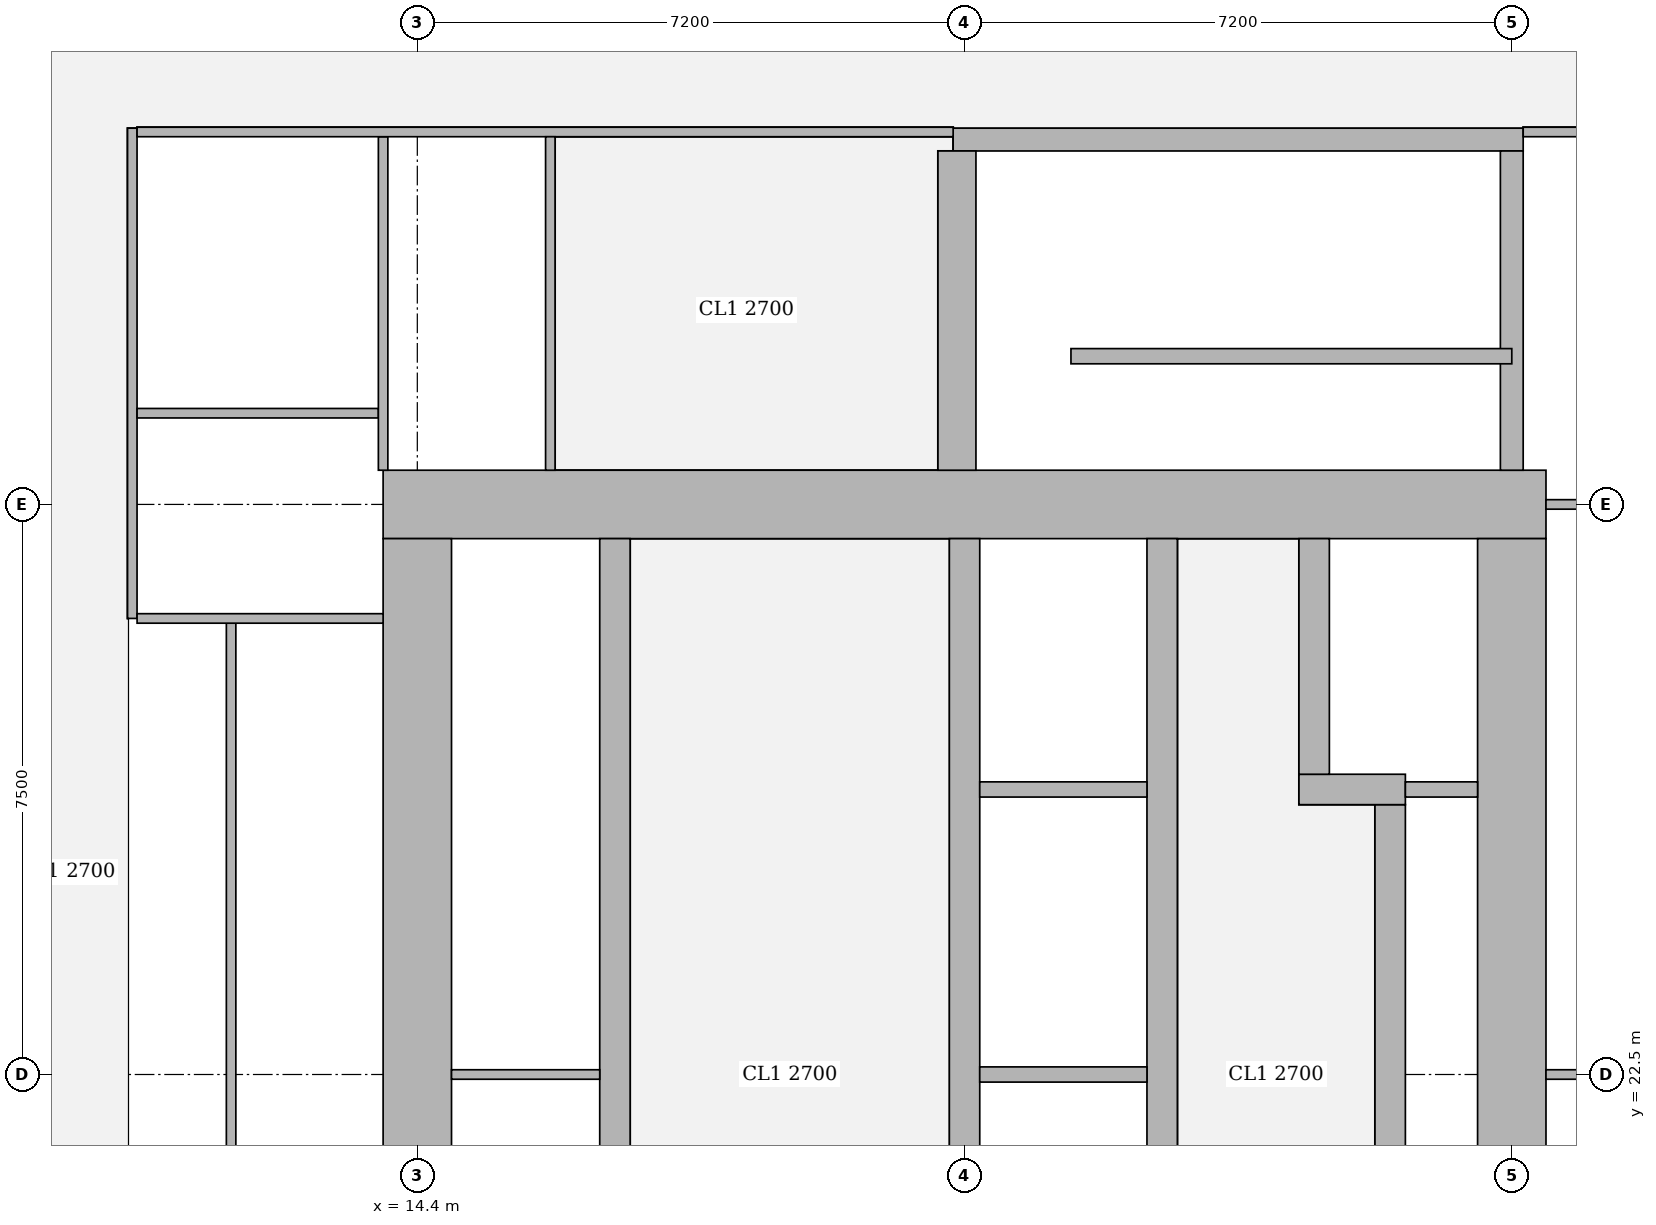
"""IFC4 building model, lengths in metres.
Left out: names, types, materials, properties, quantities, classifications, styles, units other than length and angle.
Written with IfcOpenShell. Run it as: python <this file> out.ifc"""

import sys

from ifc_helpers import new_model, si_unit, direction, frame, frame_2d, origin, place, context, subcontext, project, spatial, rectangle, extrude, element, fill, save


model = new_model("IFC4")
c1 = context("Model", 3, precision=1e-05, world=origin(), true_north=direction((0.0, 1.0)))
c2 = subcontext(c1, "Body", "Model", "MODEL_VIEW")
j1 = project(units=[si_unit("LENGTHUNIT", "METRE"), si_unit("PLANEANGLEUNIT", "RADIAN")], contexts=[c1])
p1 = place(None, origin())
s1 = spatial("IfcSite", under=j1, at=p1, CompositionType="ELEMENT")
p2 = place(p1, origin())
s2 = spatial("IfcBuilding", under=s1, at=p2, CompositionType="ELEMENT")
p3 = place(p2, frame((0.0, 0.0, 216.2)))
s3 = spatial("IfcBuildingStorey", under=s2, at=p3, CompositionType="ELEMENT", Elevation=216.2)
p4 = place(p3, frame((13.95, 30.0, 0.0), z_axis=(0.0, 0.0, 1.0), x_axis=(1.0, 0.0, 0.0)))
e1 = element("IfcWall", 1, at=p4, inside=s3, PredefinedType="SHEAR", context=c2, shape_type="SweptSolid", body=[
    extrude(rectangle(XDim=15.3, YDim=0.9, at=frame_2d((7.65, 0.0))), origin(), (0.0, 0.0, 1.0), 3.75),
])
p5 = place(p4, frame((4.45, 0.0, 0.0)))
e2 = element("IfcOpeningElement", 2, at=p5, cuts=e1, PredefinedType="OPENING", context=c2, shape_type="SweptSolid", body=[
    extrude(rectangle(XDim=1.8, YDim=2.1, at=frame_2d((0.9, 1.05))), frame((0.0, 0.46, 0.0), z_axis=(0.0, -1.0, 0.0), x_axis=(1.0, 0.0, 0.0)), (0.0, 0.0, 1.0), 0.92),
])
p6 = place(p4, frame((10.7, 0.0, 0.0)))
e3 = element("IfcOpeningElement", 3, at=p6, cuts=e1, PredefinedType="OPENING", context=c2, shape_type="SweptSolid", body=[
    extrude(rectangle(XDim=1.1, YDim=2.1, at=frame_2d((0.55, 1.05))), frame((0.0, 0.46, 0.0), z_axis=(0.0, -1.0, 0.0), x_axis=(1.0, 0.0, 0.0)), (0.0, 0.0, 1.0), 0.92),
])
for number, where, z_axis, x_axis in (
    (4, (14.4, 15.45, 0.0), (0.0, 0.0, 1.0), (0.0, 1.0, 0.0)),
    (5, (28.8, 15.45, 0.0), (0.0, 0.0, 1.0), (0.0, 1.0, 0.0)),
):
    element("IfcWall", number, at=place(p3, frame(where, z_axis=z_axis, x_axis=x_axis)), inside=s3, PredefinedType="SHEAR", context=c2, shape_type="SweptSolid", body=[
        extrude(rectangle(XDim=14.1, YDim=0.9, at=frame_2d((7.05, 0.0))), origin(), (0.0, 0.0, 1.0), 3.75),
    ])
p7 = place(p3, frame((17.0, 15.45, 0.0), z_axis=(0.0, 0.0, 1.0), x_axis=(0.0, 1.0, 0.0)))
e6 = element("IfcWall", 6, at=p7, inside=s3, PredefinedType="SHEAR", context=c2, shape_type="SweptSolid", body=[
    extrude(rectangle(XDim=14.1, YDim=0.4, at=frame_2d((7.05, 0.0))), origin(), (0.0, 0.0, 1.0), 3.75),
])
p8 = place(p7, frame((0.925, 0.0, 0.0)))
e7 = element("IfcOpeningElement", 7, at=p8, cuts=e6, PredefinedType="OPENING", context=c2, shape_type="SweptSolid", body=[
    extrude(rectangle(XDim=1.0, YDim=2.1, at=frame_2d((0.5, 1.05))), frame((0.0, 0.21, 0.0), z_axis=(0.0, -1.0, 0.0), x_axis=(1.0, 0.0, 0.0)), (0.0, 0.0, 1.0), 0.42),
])
p9 = place(p7, frame((4.675, 0.0, 0.0)))
e8 = element("IfcOpeningElement", 8, at=p9, cuts=e6, PredefinedType="OPENING", context=c2, shape_type="SweptSolid", body=[
    extrude(rectangle(XDim=1.0, YDim=2.1, at=frame_2d((0.5, 1.05))), frame((0.0, 0.21, 0.0), z_axis=(0.0, -1.0, 0.0), x_axis=(1.0, 0.0, 0.0)), (0.0, 0.0, 1.0), 0.42),
])
p10 = place(p7, frame((8.425, 0.0, 0.0)))
e9 = element("IfcOpeningElement", 9, at=p10, cuts=e6, PredefinedType="OPENING", context=c2, shape_type="SweptSolid", body=[
    extrude(rectangle(XDim=1.0, YDim=2.1, at=frame_2d((0.5, 1.05))), frame((0.0, 0.21, 0.0), z_axis=(0.0, -1.0, 0.0), x_axis=(1.0, 0.0, 0.0)), (0.0, 0.0, 1.0), 0.42),
])
p11 = place(p7, frame((12.175, 0.0, 0.0)))
e10 = element("IfcOpeningElement", 10, at=p11, cuts=e6, PredefinedType="OPENING", context=c2, shape_type="SweptSolid", body=[
    extrude(rectangle(XDim=1.0, YDim=2.1, at=frame_2d((0.5, 1.05))), frame((0.0, 0.21, 0.0), z_axis=(0.0, -1.0, 0.0), x_axis=(1.0, 0.0, 0.0)), (0.0, 0.0, 1.0), 0.42),
])
p12 = place(p3, frame((21.6, 15.45, 0.0), z_axis=(0.0, 0.0, 1.0), x_axis=(0.0, 1.0, 0.0)))
e11 = element("IfcWall", 11, at=p12, inside=s3, PredefinedType="SHEAR", context=c2, shape_type="SweptSolid", body=[
    extrude(rectangle(XDim=14.1, YDim=0.4, at=frame_2d((7.05, 0.0))), origin(), (0.0, 0.0, 1.0), 3.75),
])
p13 = place(p12, frame((0.875, 0.0, 0.0)))
e12 = element("IfcOpeningElement", 12, at=p13, cuts=e11, PredefinedType="OPENING", context=c2, shape_type="SweptSolid", body=[
    extrude(rectangle(XDim=1.1, YDim=2.1, at=frame_2d((0.55, 1.05))), frame((0.0, 0.21, 0.0), z_axis=(0.0, -1.0, 0.0), x_axis=(1.0, 0.0, 0.0)), (0.0, 0.0, 1.0), 0.42),
])
p14 = place(p12, frame((4.625, 0.0, 0.0)))
e13 = element("IfcOpeningElement", 13, at=p14, cuts=e11, PredefinedType="OPENING", context=c2, shape_type="SweptSolid", body=[
    extrude(rectangle(XDim=1.1, YDim=2.1, at=frame_2d((0.55, 1.05))), frame((0.0, 0.21, 0.0), z_axis=(0.0, -1.0, 0.0), x_axis=(1.0, 0.0, 0.0)), (0.0, 0.0, 1.0), 0.42),
])
p15 = place(p12, frame((8.375, 0.0, 0.0)))
e14 = element("IfcOpeningElement", 14, at=p15, cuts=e11, PredefinedType="OPENING", context=c2, shape_type="SweptSolid", body=[
    extrude(rectangle(XDim=1.1, YDim=2.1, at=frame_2d((0.55, 1.05))), frame((0.0, 0.21, 0.0), z_axis=(0.0, -1.0, 0.0), x_axis=(1.0, 0.0, 0.0)), (0.0, 0.0, 1.0), 0.42),
])
p16 = place(p12, frame((12.125, 0.0, 0.0)))
e15 = element("IfcOpeningElement", 15, at=p16, cuts=e11, PredefinedType="OPENING", context=c2, shape_type="SweptSolid", body=[
    extrude(rectangle(XDim=1.1, YDim=2.1, at=frame_2d((0.55, 1.05))), frame((0.0, 0.21, 0.0), z_axis=(0.0, -1.0, 0.0), x_axis=(1.0, 0.0, 0.0)), (0.0, 0.0, 1.0), 0.42),
])
p17 = place(p3, frame((24.2, 15.45, 0.0), z_axis=(0.0, 0.0, 1.0), x_axis=(0.0, 1.0, 0.0)))
e16 = element("IfcWall", 16, at=p17, inside=s3, PredefinedType="SHEAR", context=c2, shape_type="SweptSolid", body=[
    extrude(rectangle(XDim=14.1, YDim=0.4, at=frame_2d((7.05, 0.0))), origin(), (0.0, 0.0, 1.0), 3.75),
])
p18 = place(p3, frame((27.2, 18.95, 0.0), z_axis=(0.0, 0.0, 1.0), x_axis=(0.0, 1.0, 0.0)))
e17 = element("IfcWall", 17, at=p18, inside=s3, PredefinedType="SHEAR", context=c2, shape_type="SweptSolid", body=[
    extrude(rectangle(XDim=7.1, YDim=0.4, at=frame_2d((3.55, 0.0))), origin(), (0.0, 0.0, 1.0), 3.75),
])
p19 = place(p3, frame((26.0, 26.25, 0.0), z_axis=(0.0, 0.0, 1.0), x_axis=(1.0, 0.0, 0.0)))
e18 = element("IfcWall", 18, at=p19, inside=s3, PredefinedType="SHEAR", context=c2, shape_type="SweptSolid", body=[
    extrude(rectangle(XDim=1.4, YDim=0.4, at=frame_2d((0.7, 0.0))), origin(), (0.0, 0.0, 1.0), 3.75),
])
p20 = place(p3, frame((26.2, 26.45, 0.0), z_axis=(0.0, 0.0, 1.0), x_axis=(0.0, 1.0, 0.0)))
e19 = element("IfcWall", 19, at=p20, inside=s3, PredefinedType="SHEAR", context=c2, shape_type="SweptSolid", body=[
    extrude(rectangle(XDim=3.1, YDim=0.4, at=frame_2d((1.55, 0.0))), origin(), (0.0, 0.0, 1.0), 3.75),
])
p21 = place(p20, frame((1.075, 0.0, 0.0)))
e20 = element("IfcOpeningElement", 20, at=p21, cuts=e19, PredefinedType="OPENING", context=c2, shape_type="SweptSolid", body=[
    extrude(rectangle(XDim=1.2, YDim=2.1, at=frame_2d((0.6, 1.05))), frame((0.0, 0.21, 0.0), z_axis=(0.0, -1.0, 0.0), x_axis=(1.0, 0.0, 0.0)), (0.0, 0.0, 1.0), 0.42),
])
p22 = place(p3, frame((21.45, 34.8, 0.0), z_axis=(0.0, 0.0, 1.0), x_axis=(1.0, 0.0, 0.0)))
e21 = element("IfcWall", 21, at=p22, inside=s3, PredefinedType="SHEAR", context=c2, shape_type="SweptSolid", body=[
    extrude(rectangle(XDim=7.5, YDim=0.3, at=frame_2d((3.75, 0.0))), origin(), (0.0, 0.0, 1.0), 3.75),
])
p23 = place(p22, frame((0.5, 0.0, 0.0)))
e22 = element("IfcOpeningElement", 22, at=p23, cuts=e21, PredefinedType="OPENING", context=c2, shape_type="SweptSolid", body=[
    extrude(rectangle(XDim=1.1, YDim=2.1, at=frame_2d((0.55, 1.05))), frame((0.0, 0.16, 0.0), z_axis=(0.0, -1.0, 0.0), x_axis=(1.0, 0.0, 0.0)), (0.0, 0.0, 1.0), 0.32),
])
p24 = place(p3, frame((21.5, 30.45, 0.0), z_axis=(0.0, 0.0, 1.0), x_axis=(0.0, 1.0, 0.0)))
e23 = element("IfcWall", 23, at=p24, inside=s3, PredefinedType="SHEAR", context=c2, shape_type="SweptSolid", body=[
    extrude(rectangle(XDim=4.2, YDim=0.5, at=frame_2d((2.1, 0.0))), origin(), (0.0, 0.0, 1.0), 3.75),
])
p25 = place(p3, frame((28.8, 30.45, 0.0), z_axis=(0.0, 0.0, 1.0), x_axis=(0.0, 1.0, 0.0)))
e24 = element("IfcWall", 24, at=p25, inside=s3, PredefinedType="SHEAR", context=c2, shape_type="SweptSolid", body=[
    extrude(rectangle(XDim=4.2, YDim=0.3, at=frame_2d((2.1, 0.0))), origin(), (0.0, 0.0, 1.0), 3.75),
])
p26 = place(p3, frame((10.65, 28.5, 0.0), z_axis=(0.0, 0.0, 1.0), x_axis=(0.0, 1.0, 0.0)))
e25 = element("IfcWall", 25, at=p26, inside=s3, PredefinedType="PARTITIONING", context=c2, shape_type="SweptSolid", body=[
    extrude(rectangle(XDim=6.45, YDim=0.125, at=frame_2d((3.225, 0.0))), origin(), (0.0, 0.0, 1.0), 3.5),
])
p27 = place(p26, frame((0.85, 0.0, 0.0)))
e26 = element("IfcOpeningElement", 26, at=p27, cuts=e25, PredefinedType="OPENING", context=c2, shape_type="SweptSolid", body=[
    extrude(rectangle(XDim=1.0, YDim=2.1, at=frame_2d((0.5, 1.05))), frame((0.0, 0.073, 0.0), z_axis=(0.0, -1.0, 0.0), x_axis=(1.0, 0.0, 0.0)), (0.0, 0.0, 1.0), 0.145),
])
p28 = place(p26, frame((4.075, 0.0, 0.0)))
e27 = element("IfcOpeningElement", 27, at=p28, cuts=e25, PredefinedType="OPENING", context=c2, shape_type="SweptSolid", body=[
    extrude(rectangle(XDim=1.0, YDim=2.1, at=frame_2d((0.5, 1.05))), frame((0.0, 0.073, 0.0), z_axis=(0.0, -1.0, 0.0), x_axis=(1.0, 0.0, 0.0)), (0.0, 0.0, 1.0), 0.145),
])
p29 = place(p3, frame((11.95, 19.562, 0.0), z_axis=(0.0, 0.0, 1.0), x_axis=(0.0, 1.0, 0.0)))
e28 = element("IfcWall", 28, at=p29, inside=s3, PredefinedType="PARTITIONING", context=c2, shape_type="SweptSolid", body=[
    extrude(rectangle(XDim=8.876, YDim=0.125, at=frame_2d((4.438, 0.0))), origin(), (0.0, 0.0, 1.0), 3.5),
])
p30 = place(p29, frame((3.938, 0.0, 0.0)))
e29 = element("IfcOpeningElement", 29, at=p30, cuts=e28, PredefinedType="OPENING", context=c2, shape_type="SweptSolid", body=[
    extrude(rectangle(XDim=1.0, YDim=2.1, at=frame_2d((0.5, 1.05))), frame((0.0, 0.073, 0.0), z_axis=(0.0, -1.0, 0.0), x_axis=(1.0, 0.0, 0.0)), (0.0, 0.0, 1.0), 0.145),
])
p31 = place(p3, frame((10.713, 28.5, 0.0), z_axis=(0.0, 0.0, 1.0), x_axis=(1.0, 0.0, 0.0)))
e30 = element("IfcWall", 30, at=p31, inside=s3, PredefinedType="PARTITIONING", context=c2, shape_type="SweptSolid", body=[
    extrude(rectangle(XDim=3.237, YDim=0.125, at=frame_2d((1.619, 0.0))), origin(), (0.0, 0.0, 1.0), 3.5),
])
p32 = place(p3, frame((10.713, 31.2, 0.0), z_axis=(0.0, 0.0, 1.0), x_axis=(1.0, 0.0, 0.0)))
e31 = element("IfcWall", 31, at=p32, inside=s3, PredefinedType="PARTITIONING", context=c2, shape_type="SweptSolid", body=[
    extrude(rectangle(XDim=3.175, YDim=0.125, at=frame_2d((1.587, 0.0))), origin(), (0.0, 0.0, 1.0), 3.5),
])
p33 = place(p3, frame((13.95, 30.45, 0.0), z_axis=(0.0, 0.0, 1.0), x_axis=(0.0, 1.0, 0.0)))
e32 = element("IfcWall", 32, at=p33, inside=s3, PredefinedType="PARTITIONING", context=c2, shape_type="SweptSolid", body=[
    extrude(rectangle(XDim=4.387, YDim=0.125, at=frame_2d((2.193, 0.0))), origin(), (0.0, 0.0, 1.0), 3.5),
])
p34 = place(p3, frame((10.713, 34.9, 0.0), z_axis=(0.0, 0.0, 1.0), x_axis=(1.0, 0.0, 0.0)))
e33 = element("IfcWall", 33, at=p34, inside=s3, PredefinedType="PARTITIONING", context=c2, shape_type="SweptSolid", body=[
    extrude(rectangle(XDim=10.737, YDim=0.125, at=frame_2d((5.369, 0.0))), origin(), (0.0, 0.0, 1.0), 3.5),
])
p35 = place(p34, frame((7.187, 0.0, 0.0)))
e34 = element("IfcOpeningElement", 34, at=p35, cuts=e33, PredefinedType="OPENING", context=c2, shape_type="SweptSolid", body=[
    extrude(rectangle(XDim=1.8, YDim=2.1, at=frame_2d((0.9, 1.05))), frame((0.0, 0.073, 0.0), z_axis=(0.0, -1.0, 0.0), x_axis=(1.0, 0.0, 0.0)), (0.0, 0.0, 1.0), 0.145),
])
p36 = place(p3, frame((16.15, 30.45, 0.0), z_axis=(0.0, 0.0, 1.0), x_axis=(0.0, 1.0, 0.0)))
e35 = element("IfcWall", 35, at=p36, inside=s3, PredefinedType="PARTITIONING", context=c2, shape_type="SweptSolid", body=[
    extrude(rectangle(XDim=4.387, YDim=0.125, at=frame_2d((2.193, 0.0))), origin(), (0.0, 0.0, 1.0), 3.5),
])
p37 = place(p36, frame((1.75, 0.0, 0.0)))
e36 = element("IfcOpeningElement", 36, at=p37, cuts=e35, PredefinedType="OPENING", context=c2, shape_type="SweptSolid", body=[
    extrude(rectangle(XDim=1.0, YDim=2.1, at=frame_2d((0.5, 1.05))), frame((0.0, 0.073, 0.0), z_axis=(0.0, -1.0, 0.0), x_axis=(1.0, 0.0, 0.0)), (0.0, 0.0, 1.0), 0.145),
])
p38 = place(p3, frame((28.95, 34.9, 0.0), z_axis=(0.0, 0.0, 1.0), x_axis=(1.0, 0.0, 0.0)))
e37 = element("IfcWall", 37, at=p38, inside=s3, PredefinedType="PARTITIONING", context=c2, shape_type="SweptSolid", body=[
    extrude(rectangle(XDim=4.588, YDim=0.125, at=frame_2d((2.294, 0.0))), origin(), (0.0, 0.0, 1.0), 3.5),
])
for number, where, z_axis, x_axis in (
    (38, (29.25, 22.5, 0.0), (0.0, 0.0, 1.0), (1.0, 0.0, 0.0)),
    (39, (29.25, 30.0, 0.0), (0.0, 0.0, 1.0), (1.0, 0.0, 0.0)),
):
    element("IfcWall", number, at=place(p3, frame(where, z_axis=z_axis, x_axis=x_axis)), inside=s3, PredefinedType="PARTITIONING", context=c2, shape_type="SweptSolid", body=[
        extrude(rectangle(XDim=3.049, YDim=0.125, at=frame_2d((1.524, 0.0))), origin(), (0.0, 0.0, 1.0), 3.5),
    ])
p39 = place(p3, frame((14.85, 22.5, 0.0), z_axis=(0.0, 0.0, 1.0), x_axis=(1.0, 0.0, 0.0)))
e40 = element("IfcWall", 40, at=p39, inside=s3, PredefinedType="PARTITIONING", context=c2, shape_type="SweptSolid", body=[
    extrude(rectangle(XDim=1.95, YDim=0.125, at=frame_2d((0.975, 0.0))), origin(), (0.0, 0.0, 1.0), 3.5),
])
p40 = place(p3, frame((23.0, 31.95, 0.0), z_axis=(0.0, 0.0, 1.0), x_axis=(1.0, 0.0, 0.0)))
e41 = element("IfcWall", 41, at=p40, inside=s3, PredefinedType="SHEAR", context=c2, shape_type="SweptSolid", body=[
    extrude(rectangle(XDim=5.8, YDim=0.2, at=frame_2d((2.9, 0.0))), origin(), (0.0, 0.0, 1.0), 3.75),
])
for number, where, z_axis, x_axis in (
    (42, (21.8, 22.5, 0.0), (0.0, 0.0, 1.0), (1.0, 0.0, 0.0)),
    (43, (21.8, 26.25, 0.0), (0.0, 0.0, 1.0), (1.0, 0.0, 0.0)),
):
    element("IfcWall", number, at=place(p3, frame(where, z_axis=z_axis, x_axis=x_axis)), inside=s3, PredefinedType="SOLIDWALL", context=c2, shape_type="SweptSolid", body=[
        extrude(rectangle(XDim=2.2, YDim=0.2, at=frame_2d((1.1, 0.0))), origin(), (0.0, 0.0, 1.0), 3.5),
    ])
p41 = place(p3, frame((27.4, 26.25, 0.0), z_axis=(0.0, 0.0, 1.0), x_axis=(1.0, 0.0, 0.0)))
e44 = element("IfcWall", 44, at=p41, inside=s3, PredefinedType="SOLIDWALL", context=c2, shape_type="SweptSolid", body=[
    extrude(rectangle(XDim=0.95, YDim=0.2, at=frame_2d((0.475, 0.0))), origin(), (0.0, 0.0, 1.0), 3.5),
])
p42 = place(p30, origin())
e45 = element("IfcDoor", 45, at=p42, inside=s3, OperationType="SINGLE_SWING_LEFT", PredefinedType="DOOR", context=c2, shape_type="SweptSolid", body=[
    extrude(rectangle(XDim=1.0, YDim=2.1, at=frame_2d((0.5, 1.05))), frame((0.0, 0.025, 0.0), z_axis=(0.0, -1.0, 0.0), x_axis=(1.0, 0.0, 0.0)), (0.0, 0.0, 1.0), 0.05),
])
fill(e29, e45)
p43 = place(p27, origin())
e46 = element("IfcDoor", 46, at=p43, inside=s3, OperationType="SINGLE_SWING_RIGHT", PredefinedType="DOOR", context=c2, shape_type="SweptSolid", body=[
    extrude(rectangle(XDim=1.0, YDim=2.1, at=frame_2d((0.5, 1.05))), frame((0.0, 0.025, 0.0), z_axis=(0.0, -1.0, 0.0), x_axis=(1.0, 0.0, 0.0)), (0.0, 0.0, 1.0), 0.05),
])
fill(e26, e46)
p44 = place(p28, origin())
e47 = element("IfcDoor", 47, at=p44, inside=s3, OperationType="SINGLE_SWING_LEFT", PredefinedType="DOOR", context=c2, shape_type="SweptSolid", body=[
    extrude(rectangle(XDim=1.0, YDim=2.1, at=frame_2d((0.5, 1.05))), frame((0.0, 0.025, 0.0), z_axis=(0.0, -1.0, 0.0), x_axis=(1.0, 0.0, 0.0)), (0.0, 0.0, 1.0), 0.05),
])
fill(e27, e47)
p45 = place(p37, origin())
e48 = element("IfcDoor", 48, at=p45, inside=s3, OperationType="SINGLE_SWING_RIGHT", PredefinedType="DOOR", context=c2, shape_type="SweptSolid", body=[
    extrude(rectangle(XDim=1.0, YDim=2.1, at=frame_2d((0.5, 1.05))), frame((0.0, 0.025, 0.0), z_axis=(0.0, -1.0, 0.0), x_axis=(1.0, 0.0, 0.0)), (0.0, 0.0, 1.0), 0.05),
])
fill(e36, e48)
p46 = place(p35, origin())
e49 = element("IfcDoor", 49, at=p46, inside=s3, OperationType="DOUBLE_DOOR_SINGLE_SWING", PredefinedType="DOOR", context=c2, shape_type="SweptSolid", body=[
    extrude(rectangle(XDim=1.8, YDim=2.1, at=frame_2d((0.9, 1.05))), frame((0.0, 0.025, 0.0), z_axis=(0.0, -1.0, 0.0), x_axis=(1.0, 0.0, 0.0)), (0.0, 0.0, 1.0), 0.05),
])
fill(e34, e49)
p47 = place(p10, origin())
e50 = element("IfcDoor", 50, at=p47, inside=s3, OperationType="SINGLE_SWING_LEFT", PredefinedType="DOOR", context=c2, shape_type="SweptSolid", body=[
    extrude(rectangle(XDim=1.0, YDim=2.1, at=frame_2d((0.5, 1.05))), frame((0.0, 0.025, 0.0), z_axis=(0.0, -1.0, 0.0), x_axis=(1.0, 0.0, 0.0)), (0.0, 0.0, 1.0), 0.05),
])
fill(e9, e50)
p48 = place(p11, origin())
e51 = element("IfcDoor", 51, at=p48, inside=s3, OperationType="SINGLE_SWING_RIGHT", PredefinedType="DOOR", context=c2, shape_type="SweptSolid", body=[
    extrude(rectangle(XDim=1.0, YDim=2.1, at=frame_2d((0.5, 1.05))), frame((0.0, 0.025, 0.0), z_axis=(0.0, -1.0, 0.0), x_axis=(1.0, 0.0, 0.0)), (0.0, 0.0, 1.0), 0.05),
])
fill(e10, e51)
p49 = place(p5, origin())
e52 = element("IfcDoor", 52, at=p49, inside=s3, OperationType="DOUBLE_DOOR_SINGLE_SWING", PredefinedType="DOOR", context=c2, shape_type="SweptSolid", body=[
    extrude(rectangle(XDim=1.8, YDim=2.1, at=frame_2d((0.9, 1.05))), frame((0.0, 0.025, 0.0), z_axis=(0.0, -1.0, 0.0), x_axis=(1.0, 0.0, 0.0)), (0.0, 0.0, 1.0), 0.05),
])
fill(e2, e52)
p50 = place(p6, origin())
e53 = element("IfcDoor", 53, at=p50, inside=s3, OperationType="SINGLE_SWING_LEFT", PredefinedType="DOOR", context=c2, shape_type="SweptSolid", body=[
    extrude(rectangle(XDim=1.1, YDim=2.1, at=frame_2d((0.55, 1.05))), frame((0.0, 0.025, 0.0), z_axis=(0.0, -1.0, 0.0), x_axis=(1.0, 0.0, 0.0)), (0.0, 0.0, 1.0), 0.05),
])
fill(e3, e53)
p51 = place(p21, origin())
e54 = element("IfcDoor", 54, at=p51, inside=s3, OperationType="DOUBLE_DOOR_SLIDING", PredefinedType="DOOR", context=c2, shape_type="SweptSolid", body=[
    extrude(rectangle(XDim=1.2, YDim=2.1, at=frame_2d((0.6, 1.05))), frame((0.0, 0.025, 0.0), z_axis=(0.0, -1.0, 0.0), x_axis=(1.0, 0.0, 0.0)), (0.0, 0.0, 1.0), 0.05),
])
fill(e20, e54)
p52 = place(p15, origin())
e55 = element("IfcDoor", 55, at=p52, inside=s3, OperationType="DOUBLE_DOOR_SLIDING", PredefinedType="DOOR", context=c2, shape_type="SweptSolid", body=[
    extrude(rectangle(XDim=1.1, YDim=2.1, at=frame_2d((0.55, 1.05))), frame((0.0, 0.025, 0.0), z_axis=(0.0, -1.0, 0.0), x_axis=(1.0, 0.0, 0.0)), (0.0, 0.0, 1.0), 0.05),
])
fill(e14, e55)
p53 = place(p16, origin())
e56 = element("IfcDoor", 56, at=p53, inside=s3, OperationType="DOUBLE_DOOR_SLIDING", PredefinedType="DOOR", context=c2, shape_type="SweptSolid", body=[
    extrude(rectangle(XDim=1.1, YDim=2.1, at=frame_2d((0.55, 1.05))), frame((0.0, 0.025, 0.0), z_axis=(0.0, -1.0, 0.0), x_axis=(1.0, 0.0, 0.0)), (0.0, 0.0, 1.0), 0.05),
])
fill(e15, e56)
p54 = place(p23, origin())
e57 = element("IfcDoor", 57, at=p54, inside=s3, OperationType="SINGLE_SWING_RIGHT", PredefinedType="DOOR", context=c2, shape_type="SweptSolid", body=[
    extrude(rectangle(XDim=1.1, YDim=2.1, at=frame_2d((0.55, 1.05))), frame((0.0, 0.025, 0.0), z_axis=(0.0, -1.0, 0.0), x_axis=(1.0, 0.0, 0.0)), (0.0, 0.0, 1.0), 0.05),
])
fill(e22, e57)
save(model, sys.argv[1])
